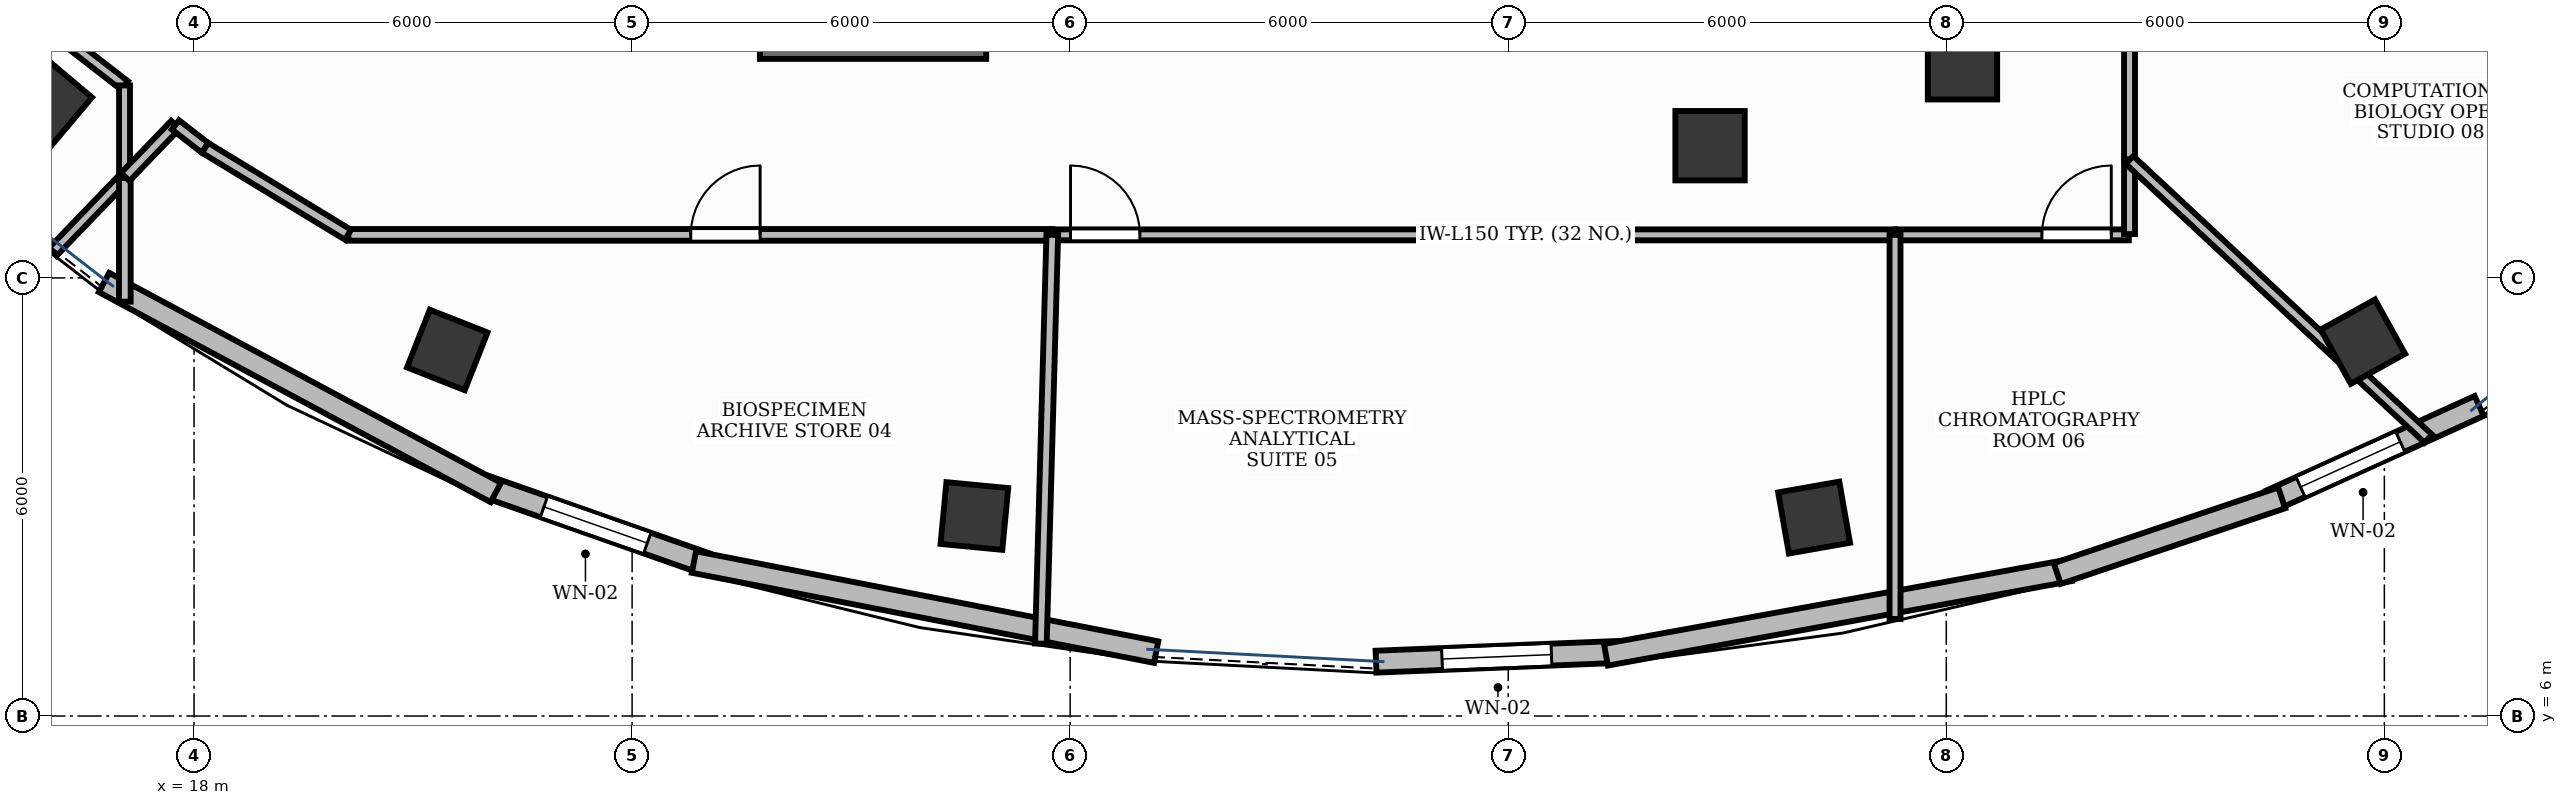
"""IFC4 building model, lengths in metres.
Left out: names, types, materials, properties, quantities, classifications, styles, units other than length and angle.
Written with IfcOpenShell. Run it as: python <this file> out.ifc"""

import sys

from ifc_helpers import new_model, si_unit, direction, frame, frame_2d, origin, origin_2d, place, context, subcontext, project, spatial, rectangle, extrude, element, fill, save


model = new_model("IFC4")
c1 = context("Model", 3, precision=1e-05, world=origin(), true_north=direction((0.0, 1.0)))
c2 = subcontext(c1, "Body", "Model", "MODEL_VIEW")
j1 = project(units=[si_unit("LENGTHUNIT", "METRE"), si_unit("PLANEANGLEUNIT", "RADIAN")], contexts=[c1])
p1 = place(None, origin())
s1 = spatial("IfcSite", under=j1, at=p1, CompositionType="ELEMENT")
p2 = place(p1, origin())
s2 = spatial("IfcBuilding", under=s1, at=p2, CompositionType="ELEMENT")
p3 = place(p2, frame((0.0, 0.0, 260.4)))
s3 = spatial("IfcBuildingStorey", under=s2, at=p3, CompositionType="ELEMENT", Elevation=260.4)
p4 = place(p3, frame((25.75, 15.2, 0.0), z_axis=(0.0, 0.0, 1.0), x_axis=(1.0, 0.0, 0.0)))
e1 = element("IfcWall", 1, at=p4, inside=s3, PredefinedType="SHEAR", context=c2, shape_type="SweptSolid", body=[
    extrude(rectangle(XDim=3.1, YDim=0.4, at=frame_2d((1.55, 0.0))), origin(), (0.0, 0.0, 1.0), 3.9),
])
for number, where, z_axis, x_axis in (
    (2, (16.003, 14.421, -0.0), (0.0, 0.0, 1.0), (-0.764, 0.645, 0.0)),
    (3, (21.469, 11.014, -0.0), (0.0, 0.0, 1.0), (-0.93, 0.367, 0.0)),
    (4, (28.688, 8.739, -0.0), (0.0, 0.0, 1.0), (-0.995, 0.095, 0.0)),
    (5, (40.189, 8.718, -0.0), (0.0, 0.0, 1.0), (0.985, 0.173, 0.0)),
):
    element("IfcColumn", number, at=place(p3, frame(where, z_axis=z_axis, x_axis=x_axis)), inside=s3, PredefinedType="COLUMN", context=c2, shape_type="SweptSolid", body=[
        extrude(rectangle(XDim=0.85, YDim=0.85, at=origin_2d()), origin(), (0.0, 0.0, 1.0), 3.901),
    ])
p5 = place(p3, frame((38.764, 13.811, -0.0), z_axis=(0.0, 0.0, 1.0), x_axis=(1.0, 0.0, 0.0)))
e6 = element("IfcColumn", 6, at=p5, inside=s3, PredefinedType="COLUMN", context=c2, shape_type="SweptSolid", body=[
    extrude(rectangle(XDim=0.95, YDim=0.95, at=origin_2d()), origin(), (0.0, 0.0, 1.0), 3.901),
])
p6 = place(p3, frame((47.706, 11.127, -0.0), z_axis=(0.0, 0.0, 1.0), x_axis=(0.874535078577, 0.484962262797, 0.0)))
e7 = element("IfcColumn", 7, at=p6, inside=s3, PredefinedType="COLUMN", context=c2, shape_type="SweptSolid", body=[
    extrude(rectangle(XDim=0.85, YDim=0.85, at=origin_2d()), origin(), (0.0, 0.0, 1.0), 3.901),
])
p7 = place(p3, frame((42.222, 14.919, -0.0), z_axis=(0.0, 0.0, 1.0), x_axis=(1.0, 0.0, 0.0)))
e8 = element("IfcColumn", 8, at=p7, inside=s3, PredefinedType="COLUMN", context=c2, shape_type="SweptSolid", body=[
    extrude(rectangle(XDim=0.95, YDim=0.95, at=origin_2d()), origin(), (0.0, 0.0, 1.0), 3.901),
])
p8 = place(p3, frame((21.992, 9.146, 0.0), z_axis=(0.0, 0.0, 1.0), x_axis=(0.943473052448, -0.331449240917, 0.0)))
e9 = element("IfcWall", 9, at=p8, inside=s3, PredefinedType="STANDARD", context=c2, shape_type="SweptSolid", body=[
    extrude(rectangle(XDim=3.196, YDim=0.3, at=frame_2d((1.598, 0.0))), origin(), (0.0, 0.0, 1.0), 3.47),
])
p9 = place(p8, frame((0.848, 0.0, 0.95)))
e10 = element("IfcOpeningElement", 10, at=p9, cuts=e9, PredefinedType="OPENING", context=c2, shape_type="SweptSolid", body=[
    extrude(rectangle(XDim=1.5, YDim=1.8, at=frame_2d((0.75, 0.9))), frame((0.0, 0.165, 0.0), z_axis=(0.0, -1.0, 0.0), x_axis=(1.0, 0.0, 0.0)), (0.0, 0.0, 1.0), 0.33),
])
p10 = place(p3, frame((34.19, 6.744, 0.0), z_axis=(0.0, 0.0, 1.0), x_axis=(0.999191145847, 0.040212610729, 0.0)))
e11 = element("IfcWall", 11, at=p10, inside=s3, PredefinedType="STANDARD", context=c2, shape_type="SweptSolid", body=[
    extrude(rectangle(XDim=3.309, YDim=0.3, at=frame_2d((1.654, 0.0))), origin(), (0.0, 0.0, 1.0), 3.9),
])
p11 = place(p10, frame((0.904, 0.0, 0.95)))
e12 = element("IfcOpeningElement", 12, at=p11, cuts=e11, PredefinedType="OPENING", context=c2, shape_type="SweptSolid", body=[
    extrude(rectangle(XDim=1.5, YDim=1.8, at=frame_2d((0.75, 0.9))), frame((0.0, 0.165, 0.0), z_axis=(0.0, -1.0, 0.0), x_axis=(1.0, 0.0, 0.0)), (0.0, 0.0, 1.0), 0.33),
])
p12 = place(p3, frame((46.442, 8.95, 0.0), z_axis=(0.0, 0.0, 1.0), x_axis=(0.910590214511, 0.413310369137, 0.0)))
e13 = element("IfcWall", 13, at=p12, inside=s3, PredefinedType="STANDARD", context=c2, shape_type="SweptSolid", body=[
    extrude(rectangle(XDim=3.137, YDim=0.3, at=frame_2d((1.569, 0.0))), origin(), (0.0, 0.0, 1.0), 3.9),
])
p13 = place(p12, frame((0.451, 0.0, 0.95)))
e14 = element("IfcOpeningElement", 14, at=p13, cuts=e13, PredefinedType="OPENING", context=c2, shape_type="SweptSolid", body=[
    extrude(rectangle(XDim=1.5, YDim=1.8, at=frame_2d((0.75, 0.9))), frame((0.0, 0.165, 0.0), z_axis=(0.0, -1.0, 0.0), x_axis=(1.0, 0.0, 0.0)), (0.0, 0.0, 1.0), 0.33),
])
p14 = place(p3, frame((16.767, 11.938, 0.0), z_axis=(0.0, 0.0, 1.0), x_axis=(0.881337457, -0.472487340454, 0.0)))
e15 = element("IfcWall", 15, at=p14, inside=s3, PredefinedType="STANDARD", context=c2, shape_type="SweptSolid", body=[
    extrude(rectangle(XDim=6.088, YDim=0.3, at=frame_2d((3.044, 0.0))), origin(), (0.0, 0.0, 1.0), 3.47),
])
p15 = place(p3, frame((24.846, 8.109, 0.0), z_axis=(0.0, 0.0, 1.0), x_axis=(0.981535331459, -0.191280927169, 0.0)))
e16 = element("IfcWall", 16, at=p15, inside=s3, PredefinedType="STANDARD", context=c2, shape_type="SweptSolid", body=[
    extrude(rectangle(XDim=6.451, YDim=0.3, at=frame_2d((3.225, 0.0))), origin(), (0.0, 0.0, 1.0), 3.47),
])
p16 = place(p3, frame((37.338, 6.838, 0.0), z_axis=(0.0, 0.0, 1.0), x_axis=(0.983805148083, 0.179241263679, 0.0)))
e17 = element("IfcWall", 17, at=p16, inside=s3, PredefinedType="STANDARD", context=c2, shape_type="SweptSolid", body=[
    extrude(rectangle(XDim=6.46, YDim=0.3, at=frame_2d((3.23, 0.0))), origin(), (0.0, 0.0, 1.0), 3.9),
])
p17 = place(p3, frame((43.52, 7.951, 0.0), z_axis=(0.0, 0.0, 1.0), x_axis=(0.94763187211, 0.319364736566, 0.0)))
e18 = element("IfcWall", 18, at=p17, inside=s3, PredefinedType="STANDARD", context=c2, shape_type="SweptSolid", body=[
    extrude(rectangle(XDim=3.244, YDim=0.3, at=frame_2d((1.622, 0.0))), origin(), (0.0, 0.0, 1.0), 3.9),
])
p18 = place(p3, frame((20.114, 12.59, 0.0), z_axis=(0.0, 0.0, 1.0), x_axis=(1.0, 0.0, 0.0)))
e19 = element("IfcWall", 19, at=p18, inside=s3, PredefinedType="PARTITIONING", context=c2, shape_type="SweptSolid", body=[
    extrude(rectangle(XDim=9.641, YDim=0.16, at=frame_2d((4.82, 0.0))), origin(), (0.0, 0.0, 1.0), 2.91),
])
p19 = place(p18, frame((4.689, 0.0, 0.0)))
e20 = element("IfcOpeningElement", 20, at=p19, cuts=e19, PredefinedType="OPENING", context=c2, shape_type="SweptSolid", body=[
    extrude(rectangle(XDim=0.95, YDim=2.15, at=frame_2d((0.475, 1.075))), frame((0.0, 0.095, 0.0), z_axis=(0.0, -1.0, 0.0), x_axis=(1.0, 0.0, 0.0)), (0.0, 0.0, 1.0), 0.19),
])
p20 = place(p3, frame((29.765, 12.59, 0.0), z_axis=(0.0, 0.0, 1.0), x_axis=(1.0, 0.0, 0.0)))
e21 = element("IfcWall", 21, at=p20, inside=s3, PredefinedType="PARTITIONING", context=c2, shape_type="SweptSolid", body=[
    extrude(rectangle(XDim=11.533, YDim=0.15, at=frame_2d((5.767, 0.0))), origin(), (0.0, 0.0, 1.0), 2.91),
])
p21 = place(p20, frame((0.24, 0.0, 0.0)))
e22 = element("IfcOpeningElement", 22, at=p21, cuts=e21, PredefinedType="OPENING", context=c2, shape_type="SweptSolid", body=[
    extrude(rectangle(XDim=0.95, YDim=2.15, at=frame_2d((0.475, 1.075))), frame((0.0, 0.09, 0.0), z_axis=(0.0, -1.0, 0.0), x_axis=(1.0, 0.0, 0.0)), (0.0, 0.0, 1.0), 0.18),
])
p22 = place(p3, frame((41.308, 12.59, 0.0), z_axis=(0.0, 0.0, 1.0), x_axis=(1.0, 0.0, 0.0)))
e23 = element("IfcWall", 23, at=p22, inside=s3, PredefinedType="PARTITIONING", context=c2, shape_type="SweptSolid", body=[
    extrude(rectangle(XDim=3.192, YDim=0.15, at=frame_2d((1.596, 0.0))), origin(), (0.0, 0.0, 1.0), 2.91),
])
p23 = place(p22, frame((2.002, 0.0, 0.0)))
e24 = element("IfcOpeningElement", 24, at=p23, cuts=e23, PredefinedType="OPENING", context=c2, shape_type="SweptSolid", body=[
    extrude(rectangle(XDim=0.95, YDim=2.15, at=frame_2d((0.475, 1.075))), frame((0.0, 0.09, 0.0), z_axis=(0.0, -1.0, 0.0), x_axis=(1.0, 0.0, 0.0)), (0.0, 0.0, 1.0), 0.18),
])
p24 = place(p3, frame((44.51, 13.625, 0.0), z_axis=(0.0, 0.0, 1.0), x_axis=(0.0, 1.0, 0.0)))
e25 = element("IfcWall", 25, at=p24, inside=s3, PredefinedType="PARTITIONING", context=c2, shape_type="SweptSolid", body=[
    extrude(rectangle(XDim=2.775, YDim=0.15, at=frame_2d((1.387, 0.0))), origin(), (0.0, 0.0, 1.0), 2.91),
])
p25 = place(p24, frame((1.585, 0.0, 0.0)))
e26 = element("IfcOpeningElement", 26, at=p25, cuts=e25, PredefinedType="OPENING", context=c2, shape_type="SweptSolid", body=[
    extrude(rectangle(XDim=0.95, YDim=2.15, at=frame_2d((0.475, 1.075))), frame((0.0, 0.09, 0.0), z_axis=(0.0, -1.0, 0.0), x_axis=(1.0, 0.0, 0.0)), (0.0, 0.0, 1.0), 0.18),
])
p26 = place(p3, frame((17.048, 13.378, 0.0), z_axis=(0.0, 0.0, 1.0), x_axis=(-0.693410652624, -0.720542619716, 0.0)))
e27 = element("IfcWall", 27, at=p26, inside=s3, PredefinedType="PARTITIONING", context=c2, shape_type="SweptSolid", body=[
    extrude(rectangle(XDim=1.422, YDim=0.15, at=frame_2d((0.711, 0.0))), origin(), (0.0, 0.0, 1.0), 2.91),
])
p27 = place(p3, frame((16.128, 15.349, 0.0), z_axis=(0.0, 0.0, 1.0), x_axis=(0.790536936783, -0.612414362651, 0.0)))
e28 = element("IfcWall", 28, at=p27, inside=s3, PredefinedType="PARTITIONING", context=c2, shape_type="SweptSolid", body=[
    extrude(rectangle(XDim=1.164, YDim=0.15, at=frame_2d((0.582, 0.0))), origin(), (0.0, 0.0, 1.0), 2.91),
])
p28 = place(p3, frame((17.048, 14.636, 0.0), z_axis=(0.0, 0.0, 1.0), x_axis=(0.0, -1.0, 0.0)))
e29 = element("IfcWall", 29, at=p28, inside=s3, PredefinedType="PARTITIONING", context=c2, shape_type="SweptSolid", body=[
    extrude(rectangle(XDim=1.258, YDim=0.15, at=frame_2d((0.629, 0.0))), origin(), (0.0, 0.0, 1.0), 2.91),
])
p29 = place(p3, frame((17.052, 11.675, 0.0), z_axis=(0.0, 0.0, 1.0), x_axis=(0.0, 1.0, 0.0)))
e30 = element("IfcWall", 30, at=p29, inside=s3, PredefinedType="PARTITIONING", context=c2, shape_type="SweptSolid", body=[
    extrude(rectangle(XDim=1.693, YDim=0.16, at=frame_2d((0.846, 0.0))), origin(), (0.0, 0.0, 1.0), 2.91),
])
p30 = place(p3, frame((17.058, 13.383, 0.0), z_axis=(0.0, 0.0, 1.0), x_axis=(0.693419009771, 0.720534577163, 0.0)))
e31 = element("IfcWall", 31, at=p30, inside=s3, PredefinedType="PARTITIONING", context=c2, shape_type="SweptSolid", body=[
    extrude(rectangle(XDim=0.99, YDim=0.16, at=frame_2d((0.495, 0.0))), origin(), (0.0, 0.0, 1.0), 2.91),
])
p31 = place(p3, frame((17.745, 14.096, 0.0), z_axis=(0.0, 0.0, 1.0), x_axis=(0.790478415243, -0.612489897904, 0.0)))
e32 = element("IfcWall", 32, at=p31, inside=s3, PredefinedType="PARTITIONING", context=c2, shape_type="SweptSolid", body=[
    extrude(rectangle(XDim=0.513, YDim=0.16, at=frame_2d((0.256, 0.0))), origin(), (0.0, 0.0, 1.0), 2.91),
])
p32 = place(p3, frame((18.151, 13.781, 0.0), z_axis=(0.0, 0.0, 1.0), x_axis=(0.854507101003, -0.519439711935, 0.0)))
e33 = element("IfcWall", 33, at=p32, inside=s3, PredefinedType="PARTITIONING", context=c2, shape_type="SweptSolid", body=[
    extrude(rectangle(XDim=2.291, YDim=0.16, at=frame_2d((1.146, 0.0))), origin(), (0.0, 0.0, 1.0), 2.91),
])
p33 = place(p3, frame((29.755, 12.59, 0.0), z_axis=(0.0, 0.0, 1.0), x_axis=(-0.02789409051, -0.999610884152, 0.0)))
e34 = element("IfcWall", 34, at=p33, inside=s3, PredefinedType="PARTITIONING", context=c2, shape_type="SweptSolid", body=[
    extrude(rectangle(XDim=5.602, YDim=0.16, at=frame_2d((2.801, 0.0))), origin(), (0.0, 0.0, 1.0), 2.91),
])
p34 = place(p3, frame((41.298, 12.59, 0.0), z_axis=(0.0, 0.0, 1.0), x_axis=(0.0, -1.0, 0.0)))
e35 = element("IfcWall", 35, at=p34, inside=s3, PredefinedType="PARTITIONING", context=c2, shape_type="SweptSolid", body=[
    extrude(rectangle(XDim=5.261, YDim=0.15, at=frame_2d((2.63, 0.0))), origin(), (0.0, 0.0, 1.0), 2.91),
])
p35 = place(p3, frame((44.51, 12.6, 0.0), z_axis=(0.0, 0.0, 1.0), x_axis=(0.0, 1.0, 0.0)))
e36 = element("IfcWall", 36, at=p35, inside=s3, PredefinedType="PARTITIONING", context=c2, shape_type="SweptSolid", body=[
    extrude(rectangle(XDim=1.015, YDim=0.15, at=frame_2d((0.508, 0.0))), origin(), (0.0, 0.0, 1.0), 2.91),
])
p36 = place(p3, frame((44.51, 13.615, 0.0), z_axis=(0.0, 0.0, 1.0), x_axis=(0.731351206573, -0.682001035662, 0.0)))
e37 = element("IfcWall", 37, at=p36, inside=s3, PredefinedType="PARTITIONING", context=c2, shape_type="SweptSolid", body=[
    extrude(rectangle(XDim=5.595, YDim=0.15, at=frame_2d((2.798, 0.0))), origin(), (0.0, 0.0, 1.0), 2.91),
])
p37 = place(p9, origin())
e38 = element("IfcWindow", 38, at=p37, inside=s3, PartitioningType="DOUBLE_PANEL_VERTICAL", PredefinedType="WINDOW", context=c2, shape_type="SweptSolid", body=[
    extrude(rectangle(XDim=1.5, YDim=1.8, at=frame_2d((0.75, 0.9))), frame((0.0, 0.03, 0.0), z_axis=(0.0, -1.0, 0.0), x_axis=(1.0, 0.0, 0.0)), (0.0, 0.0, 1.0), 0.06),
])
fill(e10, e38)
p38 = place(p11, origin())
e39 = element("IfcWindow", 39, at=p38, inside=s3, PartitioningType="DOUBLE_PANEL_VERTICAL", PredefinedType="WINDOW", context=c2, shape_type="SweptSolid", body=[
    extrude(rectangle(XDim=1.5, YDim=1.8, at=frame_2d((0.75, 0.9))), frame((0.0, 0.03, 0.0), z_axis=(0.0, -1.0, 0.0), x_axis=(1.0, 0.0, 0.0)), (0.0, 0.0, 1.0), 0.06),
])
fill(e12, e39)
p39 = place(p13, origin())
e40 = element("IfcWindow", 40, at=p39, inside=s3, PartitioningType="DOUBLE_PANEL_VERTICAL", PredefinedType="WINDOW", context=c2, shape_type="SweptSolid", body=[
    extrude(rectangle(XDim=1.5, YDim=1.8, at=frame_2d((0.75, 0.9))), frame((0.0, 0.03, 0.0), z_axis=(0.0, -1.0, 0.0), x_axis=(1.0, 0.0, 0.0)), (0.0, 0.0, 1.0), 0.06),
])
fill(e14, e40)
p40 = place(p19, origin())
e41 = element("IfcDoor", 41, at=p40, inside=s3, OperationType="SINGLE_SWING_RIGHT", PredefinedType="DOOR", context=c2, shape_type="SweptSolid", body=[
    extrude(rectangle(XDim=0.95, YDim=2.15, at=frame_2d((0.475, 1.075))), frame((0.0, 0.025, 0.0), z_axis=(0.0, -1.0, 0.0), x_axis=(1.0, 0.0, 0.0)), (0.0, 0.0, 1.0), 0.05),
])
fill(e20, e41)
p41 = place(p21, origin())
e42 = element("IfcDoor", 42, at=p41, inside=s3, OperationType="SINGLE_SWING_LEFT", PredefinedType="DOOR", context=c2, shape_type="SweptSolid", body=[
    extrude(rectangle(XDim=0.95, YDim=2.15, at=frame_2d((0.475, 1.075))), frame((0.0, 0.025, 0.0), z_axis=(0.0, -1.0, 0.0), x_axis=(1.0, 0.0, 0.0)), (0.0, 0.0, 1.0), 0.05),
])
fill(e22, e42)
p42 = place(p23, origin())
e43 = element("IfcDoor", 43, at=p42, inside=s3, OperationType="SINGLE_SWING_RIGHT", PredefinedType="DOOR", context=c2, shape_type="SweptSolid", body=[
    extrude(rectangle(XDim=0.95, YDim=2.15, at=frame_2d((0.475, 1.075))), frame((0.0, 0.025, 0.0), z_axis=(0.0, -1.0, 0.0), x_axis=(1.0, 0.0, 0.0)), (0.0, 0.0, 1.0), 0.05),
])
fill(e24, e43)
save(model, sys.argv[1])
